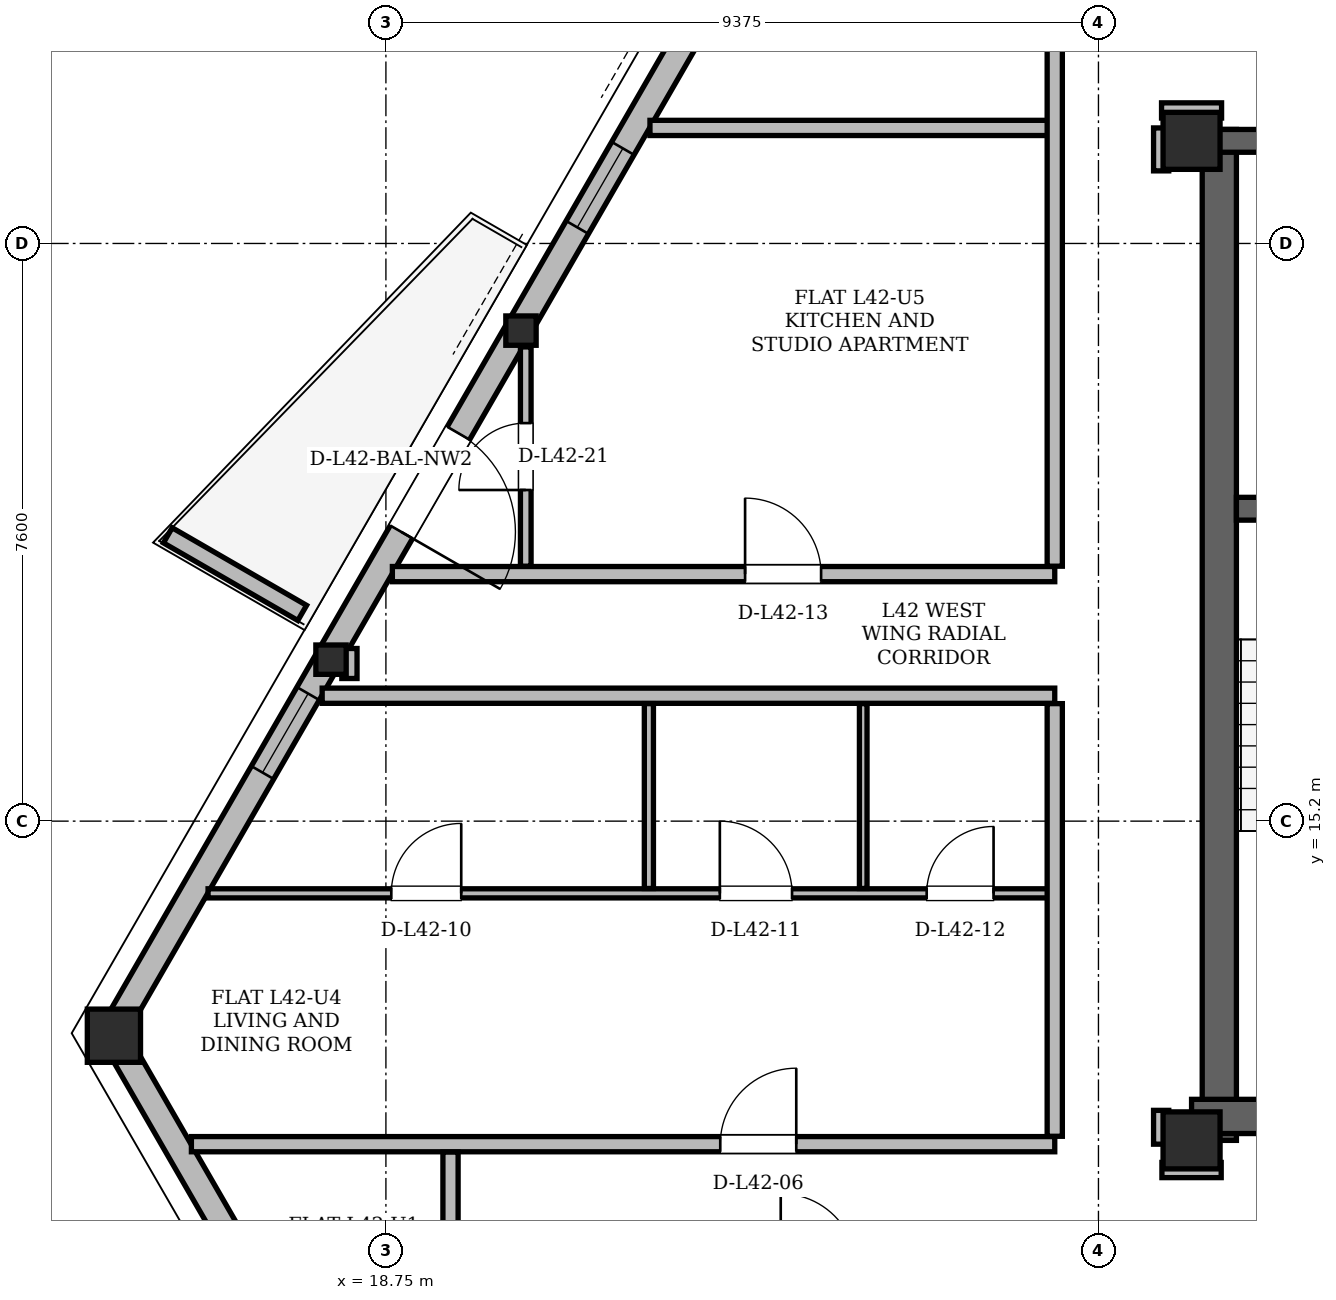
"""IFC4 building model, lengths in metres.
Left out: names, types, materials, properties, quantities, classifications, styles, units other than length and angle.
Written with IfcOpenShell. Run it as: python <this file> out.ifc"""

import sys

from ifc_helpers import new_model, si_unit, direction, frame, frame_2d, origin, origin_2d, place, context, subcontext, project, spatial, polyline, rectangle, hollow_rectangle, i_section, outline, extrude, element, fill, save


model = new_model("IFC4")
c1 = context("Model", 3, precision=1e-05, world=origin(), true_north=direction((0.0, 1.0)))
c2 = subcontext(c1, "Body", "Model", "MODEL_VIEW")
j1 = project(units=[si_unit("LENGTHUNIT", "METRE"), si_unit("PLANEANGLEUNIT", "RADIAN")], contexts=[c1])
p1 = place(None, origin())
s1 = spatial("IfcSite", under=j1, at=p1, CompositionType="ELEMENT")
p2 = place(p1, origin())
s2 = spatial("IfcBuilding", under=s1, at=p2, CompositionType="ELEMENT")
p3 = place(p2, frame((0.0, 0.0, 160.2)))
s3 = spatial("IfcBuildingStorey", under=s2, at=p3, CompositionType="ELEMENT", Elevation=160.2)
for number, where, z_axis, x_axis in (
    (1, (29.35, 11.0, 0.0), (0.0, 0.0, 1.0), (1.0, 0.0, 0.0)),
    (2, (29.35, 24.15, 0.0), (0.0, 0.0, 1.0), (1.0, 0.0, 0.0)),
):
    element("IfcColumn", number, at=place(p3, frame(where, z_axis=z_axis, x_axis=x_axis)), inside=s3, PredefinedType="COLUMN", context=c2, shape_type="SweptSolid", body=[
        extrude(hollow_rectangle(XDim=0.75, YDim=0.75, WallThickness=0.06, at=origin_2d()), origin(), (0.0, 0.0, 1.0), 3.6),
    ])
p4 = place(p3, frame((15.147, 12.41, 0.005), z_axis=(0.013594494866, -0.018352568069, 0.999739152457), x_axis=(0.803557193345, 0.595227550626, 0.0)))
e3 = element("IfcColumn", 3, at=p4, inside=s3, PredefinedType="COLUMN", context=c2, shape_type="SweptSolid", body=[
    extrude(hollow_rectangle(XDim=0.7, YDim=0.7, WallThickness=0.055, at=origin_2d()), origin(), (0.0, 0.0, 1.0), 3.592),
])
p5 = place(p3, frame((20.498, 21.678, 0.005), z_axis=(0.016313955353, -0.013662937608, 0.999773563862), x_axis=(0.642067671978, 0.766647966541, 0.0)))
e4 = element("IfcColumn", 4, at=p5, inside=s3, PredefinedType="COLUMN", context=c2, shape_type="SweptSolid", body=[
    extrude(i_section(OverallWidth=0.399, OverallDepth=0.386, WebThickness=0.021, FlangeThickness=0.033, at=origin_2d()), origin(), (0.0, 0.0, 1.0), 3.592),
])
p6 = place(p3, frame((18.001, 17.353, 0.005), z_axis=(0.015022255883, -0.015837943985, 0.99976171729), x_axis=(0.72554342724, 0.688176383777, 0.0)))
e5 = element("IfcColumn", 5, at=p6, inside=s3, PredefinedType="COLUMN", context=c2, shape_type="SweptSolid", body=[
    extrude(i_section(OverallWidth=0.399, OverallDepth=0.386, WebThickness=0.021, FlangeThickness=0.033, at=origin_2d()), origin(), (0.0, 0.0, 1.0), 3.592),
])
p7 = place(p3, frame((29.715, 11.0, 0.0), z_axis=(0.0, 0.0, 1.0), x_axis=(0.0, 1.0, 0.0)))
e6 = element("IfcWall", 6, at=p7, inside=s3, PredefinedType="SHEAR", context=c2, shape_type="SweptSolid", body=[
    extrude(rectangle(XDim=13.3, YDim=0.45, at=frame_2d((6.65, 0.0))), origin(), (0.0, 0.0, 1.0), 3.38),
])
p8 = place(p3, frame((29.35, 11.315, 0.0), z_axis=(0.0, 0.0, 1.0), x_axis=(1.0, 0.0, 0.0)))
e7 = element("IfcWall", 7, at=p8, inside=s3, PredefinedType="SHEAR", context=c2, shape_type="SweptSolid", body=[
    extrude(rectangle(XDim=7.1, YDim=0.45, at=frame_2d((3.55, 0.0))), origin(), (0.0, 0.0, 1.0), 3.38),
])
p9 = place(p3, frame((29.65, 24.15, 0.0), z_axis=(0.0, 0.0, 1.0), x_axis=(1.0, 0.0, 0.0)))
e8 = element("IfcWall", 8, at=p9, inside=s3, PredefinedType="SHEAR", context=c2, shape_type="SweptSolid", body=[
    extrude(rectangle(XDim=15.7, YDim=0.3, at=frame_2d((7.85, 0.0))), origin(), (0.0, 0.0, 1.0), 3.38),
])
p10 = place(p9, frame((1.7, 0.0, 0.0)))
e9 = element("IfcOpeningElement", 9, at=p10, cuts=e8, PredefinedType="OPENING", context=c2, shape_type="SweptSolid", body=[
    extrude(rectangle(XDim=1.2, YDim=2.2, at=frame_2d((0.6, 1.1))), frame((0.0, 0.15, 0.0), z_axis=(0.0, -1.0, 0.0), x_axis=(1.0, 0.0, 0.0)), (0.0, 0.0, 1.0), 0.3),
])
p11 = place(p9, frame((12.8, 0.0, 0.0)))
e10 = element("IfcOpeningElement", 10, at=p11, cuts=e8, PredefinedType="OPENING", context=c2, shape_type="SweptSolid", body=[
    extrude(rectangle(XDim=1.2, YDim=2.2, at=frame_2d((0.6, 1.1))), frame((0.0, 0.15, 0.0), z_axis=(0.0, -1.0, 0.0), x_axis=(1.0, 0.0, 0.0)), (0.0, 0.0, 1.0), 0.3),
])
p12 = place(p9, frame((6.55, 0.0, 0.0)))
e11 = element("IfcOpeningElement", 11, at=p12, cuts=e8, PredefinedType="OPENING", context=c2, shape_type="SweptSolid", body=[
    extrude(rectangle(XDim=0.9, YDim=2.05, at=frame_2d((0.45, 1.025))), frame((0.0, 0.15, 0.0), z_axis=(0.0, -1.0, 0.0), x_axis=(1.0, 0.0, 0.0)), (0.0, 0.0, 1.0), 0.3),
])
p13 = place(p9, frame((8.45, 0.0, 0.0)))
e12 = element("IfcOpeningElement", 12, at=p13, cuts=e8, PredefinedType="OPENING", context=c2, shape_type="SweptSolid", body=[
    extrude(rectangle(XDim=0.9, YDim=2.05, at=frame_2d((0.45, 1.025))), frame((0.0, 0.15, 0.0), z_axis=(0.0, -1.0, 0.0), x_axis=(1.0, 0.0, 0.0)), (0.0, 0.0, 1.0), 0.3),
])
p14 = place(p3, frame((29.94, 19.31, 0.0), z_axis=(0.0, 0.0, 1.0), x_axis=(1.0, 0.0, 0.0)))
e13 = element("IfcWall", 13, at=p14, inside=s3, PredefinedType="SHEAR", context=c2, shape_type="SweptSolid", body=[
    extrude(rectangle(XDim=4.01, YDim=0.3, at=frame_2d((2.005, 0.0))), origin(), (0.0, 0.0, 1.0), 3.38),
])
p15 = place(p14, frame((1.01, 0.0, 0.0)))
e14 = element("IfcOpeningElement", 14, at=p15, cuts=e13, PredefinedType="OPENING", context=c2, shape_type="SweptSolid", body=[
    extrude(rectangle(XDim=1.4, YDim=2.2, at=frame_2d((0.7, 1.1))), frame((0.0, 0.15, 0.0), z_axis=(0.0, -1.0, 0.0), x_axis=(1.0, 0.0, 0.0)), (0.0, 0.0, 1.0), 0.3),
])
p16 = place(p3, frame((15.147, 12.41, 0.0), z_axis=(0.0, 0.0, 1.0), x_axis=(0.500007864018, -0.866020863444, 0.0)))
e15 = element("IfcWall", 15, at=p16, inside=s3, PredefinedType="SOLIDWALL", context=c2, shape_type="SweptSolid", body=[
    extrude(rectangle(XDim=9.033, YDim=0.34, at=frame_2d((4.517, 0.0))), origin(), (0.0, 0.0, 1.0), 2.6),
])
p17 = place(p3, frame((32.983, 43.303, 0.0), z_axis=(0.0, 0.0, 1.0), x_axis=(-0.499995364632, -0.866028079999, 0.0)))
e16 = element("IfcWall", 16, at=p17, inside=s3, PredefinedType="SOLIDWALL", context=c2, shape_type="SweptSolid", body=[
    extrude(rectangle(XDim=35.673, YDim=0.34, at=frame_2d((17.836, 0.0))), origin(), (0.0, 0.0, 1.0), 2.6),
])
p18 = place(p17, frame((6.76, 0.0, 0.0)))
e17 = element("IfcOpeningElement", 17, at=p18, cuts=e16, PredefinedType="OPENING", context=c2, shape_type="SweptSolid", body=[
    extrude(rectangle(XDim=1.0, YDim=2.18, at=frame_2d((0.5, 1.09))), frame((0.0, 0.17, 0.0), z_axis=(0.0, -1.0, 0.0), x_axis=(1.0, 0.0, 0.0)), (0.0, 0.0, 1.0), 0.34),
])
p19 = place(p17, frame((26.558, 0.0, 0.0)))
e18 = element("IfcOpeningElement", 18, at=p19, cuts=e16, PredefinedType="OPENING", context=c2, shape_type="SweptSolid", body=[
    extrude(rectangle(XDim=1.5, YDim=2.2, at=frame_2d((0.75, 1.1))), frame((0.0, 0.17, 0.0), z_axis=(0.0, -1.0, 0.0), x_axis=(1.0, 0.0, 0.0)), (0.0, 0.0, 1.0), 0.34),
])
p20 = place(p17, frame((22.231, 0.0, 0.85)))
e19 = element("IfcOpeningElement", 19, at=p20, cuts=e16, PredefinedType="OPENING", context=c2, shape_type="SweptSolid", body=[
    extrude(rectangle(XDim=1.2, YDim=1.48, at=frame_2d((0.6, 0.74))), frame((0.0, 0.17, 0.0), z_axis=(0.0, -1.0, 0.0), x_axis=(1.0, 0.0, 0.0)), (0.0, 0.0, 1.0), 0.34),
])
p21 = place(p17, frame((11.758, 0.0, 0.85)))
e20 = element("IfcOpeningElement", 20, at=p21, cuts=e16, PredefinedType="OPENING", context=c2, shape_type="SweptSolid", body=[
    extrude(rectangle(XDim=2.2, YDim=1.64, at=frame_2d((1.1, 0.82))), frame((0.0, 0.17, 0.0), z_axis=(0.0, -1.0, 0.0), x_axis=(1.0, 0.0, 0.0)), (0.0, 0.0, 1.0), 0.34),
])
p22 = place(p17, frame((18.257, 0.0, 0.85)))
e21 = element("IfcOpeningElement", 21, at=p22, cuts=e16, PredefinedType="OPENING", context=c2, shape_type="SweptSolid", body=[
    extrude(rectangle(XDim=1.6, YDim=1.64, at=frame_2d((0.8, 0.82))), frame((0.0, 0.17, 0.0), z_axis=(0.0, -1.0, 0.0), x_axis=(1.0, 0.0, 0.0)), (0.0, 0.0, 1.0), 0.34),
])
p23 = place(p17, frame((1.108, 0.0, 0.85)))
e22 = element("IfcOpeningElement", 22, at=p23, cuts=e16, PredefinedType="OPENING", context=c2, shape_type="SweptSolid", body=[
    extrude(rectangle(XDim=1.8, YDim=1.64, at=frame_2d((0.9, 0.82))), frame((0.0, 0.17, 0.0), z_axis=(0.0, -1.0, 0.0), x_axis=(1.0, 0.0, 0.0)), (0.0, 0.0, 1.0), 0.34),
])
p24 = place(p17, frame((30.513, 0.0, 0.85)))
e23 = element("IfcOpeningElement", 23, at=p24, cuts=e16, PredefinedType="OPENING", context=c2, shape_type="SweptSolid", body=[
    extrude(rectangle(XDim=1.2, YDim=1.48, at=frame_2d((0.6, 0.74))), frame((0.0, 0.17, 0.0), z_axis=(0.0, -1.0, 0.0), x_axis=(1.0, 0.0, 0.0)), (0.0, 0.0, 1.0), 0.34),
])
p25 = place(p3, frame((17.649, 17.939, 0.0), z_axis=(0.0, 0.0, 1.0), x_axis=(-0.866012356593, 0.500022597718, 0.0)))
e24 = element("IfcWall", 24, at=p25, inside=s3, PredefinedType="PARAPET", context=c2, shape_type="SweptSolid", body=[
    extrude(outline(polyline([(0.0, 0.0), (2.042, 0.0), (2.042, 1.1), (0.0, 1.32), (0.0, 0.0)])), frame((0.0, 0.115, 0.0), z_axis=(0.0, -1.0, 0.0), x_axis=(1.0, 0.0, 0.0)), (0.0, 0.0, 1.0), 0.23),
])
p26 = place(p3, frame((28.96, 10.61, 0.0), z_axis=(0.0, 0.0, 1.0), x_axis=(1.0, 0.0, 0.0)))
e25 = element("IfcWall", 25, at=p26, inside=s3, PredefinedType="PARTITIONING", context=c2, shape_type="SweptSolid", body=[
    extrude(rectangle(XDim=0.78, YDim=0.2, at=frame_2d((0.39, 0.0))), origin(), (0.0, 0.0, 1.0), 2.42),
])
p27 = place(p3, frame((16.191, 10.95, 0.0), z_axis=(0.0, 0.0, 1.0), x_axis=(1.0, 0.0, 0.0)))
e26 = element("IfcWall", 26, at=p27, inside=s3, PredefinedType="PARTITIONING", context=c2, shape_type="SweptSolid", body=[
    extrude(rectangle(XDim=11.359, YDim=0.2, at=frame_2d((5.68, 0.0))), origin(), (0.0, 0.0, 1.0), 3.38),
])
p28 = place(p27, frame((6.958, 0.0, 0.0)))
e27 = element("IfcOpeningElement", 27, at=p28, cuts=e26, PredefinedType="OPENING", context=c2, shape_type="SweptSolid", body=[
    extrude(rectangle(XDim=1.0, YDim=2.18, at=frame_2d((0.5, 1.09))), frame((0.0, 0.1, 0.0), z_axis=(0.0, -1.0, 0.0), x_axis=(1.0, 0.0, 0.0)), (0.0, 0.0, 1.0), 0.2),
])
p29 = place(p3, frame((16.41, 14.25, 0.0), z_axis=(0.0, 0.0, 1.0), x_axis=(1.0, 0.0, 0.0)))
e28 = element("IfcWall", 28, at=p29, inside=s3, PredefinedType="PARTITIONING", context=c2, shape_type="SweptSolid", body=[
    extrude(rectangle(XDim=11.19, YDim=0.12, at=frame_2d((5.595, 0.0))), origin(), (0.0, 0.0, 1.0), 3.38),
])
p30 = place(p29, frame((2.411, 0.0, 0.0)))
e29 = element("IfcOpeningElement", 29, at=p30, cuts=e28, PredefinedType="OPENING", context=c2, shape_type="SweptSolid", body=[
    extrude(rectangle(XDim=0.92, YDim=2.12, at=frame_2d((0.46, 1.06))), frame((0.0, 0.06, 0.0), z_axis=(0.0, -1.0, 0.0), x_axis=(1.0, 0.0, 0.0)), (0.0, 0.0, 1.0), 0.12),
])
p31 = place(p29, frame((6.733, 0.0, 0.0)))
e30 = element("IfcOpeningElement", 30, at=p31, cuts=e28, PredefinedType="OPENING", context=c2, shape_type="SweptSolid", body=[
    extrude(rectangle(XDim=0.95, YDim=2.1, at=frame_2d((0.475, 1.05))), frame((0.0, 0.06, 0.0), z_axis=(0.0, -1.0, 0.0), x_axis=(1.0, 0.0, 0.0)), (0.0, 0.0, 1.0), 0.12),
])
p32 = place(p29, frame((9.455, 0.0, 0.0)))
e31 = element("IfcOpeningElement", 31, at=p32, cuts=e28, PredefinedType="OPENING", context=c2, shape_type="SweptSolid", body=[
    extrude(rectangle(XDim=0.88, YDim=2.08, at=frame_2d((0.44, 1.04))), frame((0.0, 0.06, 0.0), z_axis=(0.0, -1.0, 0.0), x_axis=(1.0, 0.0, 0.0)), (0.0, 0.0, 1.0), 0.12),
])
p33 = place(p3, frame((17.911, 16.85, 0.0), z_axis=(0.0, 0.0, 1.0), x_axis=(1.0, 0.0, 0.0)))
e32 = element("IfcWall", 32, at=p33, inside=s3, PredefinedType="PARTITIONING", context=c2, shape_type="SweptSolid", body=[
    extrude(rectangle(XDim=9.639, YDim=0.2, at=frame_2d((4.819, 0.0))), origin(), (0.0, 0.0, 1.0), 3.38),
])
p34 = place(p3, frame((18.835, 18.45, 0.0), z_axis=(0.0, 0.0, 1.0), x_axis=(1.0, 0.0, 0.0)))
e33 = element("IfcWall", 33, at=p34, inside=s3, PredefinedType="PARTITIONING", context=c2, shape_type="SweptSolid", body=[
    extrude(rectangle(XDim=8.715, YDim=0.2, at=frame_2d((4.357, 0.0))), origin(), (0.0, 0.0, 1.0), 3.38),
])
p35 = place(p34, frame((4.641, 0.0, 0.0)))
e34 = element("IfcOpeningElement", 34, at=p35, cuts=e33, PredefinedType="OPENING", context=c2, shape_type="SweptSolid", body=[
    extrude(rectangle(XDim=1.0, YDim=2.18, at=frame_2d((0.5, 1.09))), frame((0.0, 0.1, 0.0), z_axis=(0.0, -1.0, 0.0), x_axis=(1.0, 0.0, 0.0)), (0.0, 0.0, 1.0), 0.2),
])
p36 = place(p3, frame((22.224, 24.32, 0.0), z_axis=(0.0, 0.0, 1.0), x_axis=(1.0, 0.0, 0.0)))
e35 = element("IfcWall", 35, at=p36, inside=s3, PredefinedType="PARTITIONING", context=c2, shape_type="SweptSolid", body=[
    extrude(rectangle(XDim=5.326, YDim=0.2, at=frame_2d((2.663, 0.0))), origin(), (0.0, 0.0, 1.0), 3.38),
])
p37 = place(p3, frame((28.955, 24.55, 0.0), z_axis=(0.0, 0.0, 1.0), x_axis=(1.0, 0.0, 0.0)))
e36 = element("IfcWall", 36, at=p37, inside=s3, PredefinedType="PARTITIONING", context=c2, shape_type="SweptSolid", body=[
    extrude(rectangle(XDim=0.79, YDim=0.2, at=frame_2d((0.395, 0.0))), origin(), (0.0, 0.0, 1.0), 2.842),
])
p38 = place(p3, frame((18.27, 17.076, 0.0), z_axis=(0.0, 0.0, 1.0), x_axis=(0.0, 1.0, 0.0)))
e37 = element("IfcWall", 37, at=p38, inside=s3, PredefinedType="PARTITIONING", context=c2, shape_type="SweptSolid", body=[
    extrude(rectangle(XDim=0.395, YDim=0.2, at=frame_2d((0.198, 0.0))), origin(), (0.0, 0.0, 1.0), 3.38),
])
p39 = place(p3, frame((19.6, 9.404, 0.0), z_axis=(0.0, 0.0, 1.0), x_axis=(0.0, 1.0, 0.0)))
e38 = element("IfcWall", 38, at=p39, inside=s3, PredefinedType="PARTITIONING", context=c2, shape_type="SweptSolid", body=[
    extrude(rectangle(XDim=1.442, YDim=0.2, at=frame_2d((0.721, 0.0))), origin(), (0.0, 0.0, 1.0), 3.38),
])
p40 = place(p3, frame((20.59, 18.554, 0.0), z_axis=(0.0, 0.0, 1.0), x_axis=(0.0, 1.0, 0.0)))
e39 = element("IfcWall", 39, at=p40, inside=s3, PredefinedType="PARTITIONING", context=c2, shape_type="SweptSolid", body=[
    extrude(rectangle(XDim=2.885, YDim=0.14, at=frame_2d((1.442, 0.0))), origin(), (0.0, 0.0, 1.0), 3.38),
])
p41 = place(p40, frame((1.003, 0.0, 0.0)))
e40 = element("IfcOpeningElement", 40, at=p41, cuts=e39, PredefinedType="OPENING", context=c2, shape_type="SweptSolid", body=[
    extrude(rectangle(XDim=0.88, YDim=2.08, at=frame_2d((0.44, 1.04))), frame((0.0, 0.07, 0.0), z_axis=(0.0, -1.0, 0.0), x_axis=(1.0, 0.0, 0.0)), (0.0, 0.0, 1.0), 0.14),
])
p42 = place(p3, frame((22.21, 14.314, 0.0), z_axis=(0.0, 0.0, 1.0), x_axis=(0.0, 1.0, 0.0)))
e41 = element("IfcWall", 41, at=p42, inside=s3, PredefinedType="PARTITIONING", context=c2, shape_type="SweptSolid", body=[
    extrude(rectangle(XDim=2.432, YDim=0.12, at=frame_2d((1.216, 0.0))), origin(), (0.0, 0.0, 1.0), 3.38),
])
p43 = place(p3, frame((25.03, 14.314, 0.0), z_axis=(0.0, 0.0, 1.0), x_axis=(0.0, 1.0, 0.0)))
e42 = element("IfcWall", 42, at=p43, inside=s3, PredefinedType="PARTITIONING", context=c2, shape_type="SweptSolid", body=[
    extrude(rectangle(XDim=2.432, YDim=0.1, at=frame_2d((1.216, 0.0))), origin(), (0.0, 0.0, 1.0), 3.38),
])
p44 = place(p3, frame((27.55, 11.054, 0.0), z_axis=(0.0, 0.0, 1.0), x_axis=(0.0, 1.0, 0.0)))
e43 = element("IfcWall", 43, at=p44, inside=s3, PredefinedType="PARTITIONING", context=c2, shape_type="SweptSolid", body=[
    extrude(rectangle(XDim=5.692, YDim=0.2, at=frame_2d((2.846, 0.0))), origin(), (0.0, 0.0, 1.0), 2.842),
])
p45 = place(p3, frame((27.55, 18.554, 0.0), z_axis=(0.0, 0.0, 1.0), x_axis=(0.0, 1.0, 0.0)))
e44 = element("IfcWall", 44, at=p45, inside=s3, PredefinedType="PARTITIONING", context=c2, shape_type="SweptSolid", body=[
    extrude(rectangle(XDim=7.312, YDim=0.2, at=frame_2d((3.656, 0.0))), origin(), (0.0, 0.0, 1.0), 3.38),
])
p46 = place(p3, frame((28.95, 10.95, 0.0), z_axis=(0.0, 0.0, 1.0), x_axis=(0.0, 1.0, 0.0)))
e45 = element("IfcWall", 45, at=p46, inside=s3, PredefinedType="PARTITIONING", context=c2, shape_type="SweptSolid", body=[
    extrude(rectangle(XDim=0.445, YDim=0.2, at=frame_2d((0.223, 0.0))), origin(), (0.0, 0.0, 1.0), 2.842),
])
p47 = place(p3, frame((28.95, 23.755, 0.0), z_axis=(0.0, 0.0, 1.0), x_axis=(0.0, 1.0, 0.0)))
e46 = element("IfcWall", 46, at=p47, inside=s3, PredefinedType="PARTITIONING", context=c2, shape_type="SweptSolid", body=[
    extrude(rectangle(XDim=0.565, YDim=0.2, at=frame_2d((0.283, 0.0))), origin(), (0.0, 0.0, 1.0), 3.38),
])
p48 = place(p19, origin())
e47 = element("IfcDoor", 47, at=p48, inside=s3, OperationType="SINGLE_SWING_RIGHT", PredefinedType="DOOR", context=c2, shape_type="SweptSolid", body=[
    extrude(rectangle(XDim=1.5, YDim=2.2, at=frame_2d((0.75, 1.1))), frame((0.0, 0.025, 0.0), z_axis=(0.0, -1.0, 0.0), x_axis=(1.0, 0.0, 0.0)), (0.0, 0.0, 1.0), 0.05),
])
fill(e18, e47)
p49 = place(p20, origin())
e48 = element("IfcWindow", 48, at=p49, inside=s3, PartitioningType="SINGLE_PANEL", PredefinedType="WINDOW", context=c2, shape_type="SweptSolid", body=[
    extrude(rectangle(XDim=1.2, YDim=1.48, at=frame_2d((0.6, 0.74))), frame((0.0, 0.03, 0.0), z_axis=(0.0, -1.0, 0.0), x_axis=(1.0, 0.0, 0.0)), (0.0, 0.0, 1.0), 0.06),
])
fill(e19, e48)
p50 = place(p24, origin())
e49 = element("IfcWindow", 49, at=p50, inside=s3, PartitioningType="SINGLE_PANEL", PredefinedType="WINDOW", context=c2, shape_type="SweptSolid", body=[
    extrude(rectangle(XDim=1.2, YDim=1.48, at=frame_2d((0.6, 0.74))), frame((0.0, 0.03, 0.0), z_axis=(0.0, -1.0, 0.0), x_axis=(1.0, 0.0, 0.0)), (0.0, 0.0, 1.0), 0.06),
])
fill(e23, e49)
p51 = place(p28, origin())
e50 = element("IfcDoor", 50, at=p51, inside=s3, OperationType="SINGLE_SWING_RIGHT", PredefinedType="DOOR", context=c2, shape_type="SweptSolid", body=[
    extrude(rectangle(XDim=1.0, YDim=2.18, at=frame_2d((0.5, 1.09))), frame((0.0, 0.025, 0.0), z_axis=(0.0, -1.0, 0.0), x_axis=(1.0, 0.0, 0.0)), (0.0, 0.0, 1.0), 0.05),
])
fill(e27, e50)
p52 = place(p30, origin())
e51 = element("IfcDoor", 51, at=p52, inside=s3, OperationType="SINGLE_SWING_RIGHT", PredefinedType="DOOR", context=c2, shape_type="SweptSolid", body=[
    extrude(rectangle(XDim=0.92, YDim=2.12, at=frame_2d((0.46, 1.06))), frame((0.0, 0.025, 0.0), z_axis=(0.0, -1.0, 0.0), x_axis=(1.0, 0.0, 0.0)), (0.0, 0.0, 1.0), 0.05),
])
fill(e29, e51)
p53 = place(p31, origin())
e52 = element("IfcDoor", 52, at=p53, inside=s3, OperationType="SINGLE_SWING_LEFT", PredefinedType="DOOR", context=c2, shape_type="SweptSolid", body=[
    extrude(rectangle(XDim=0.95, YDim=2.1, at=frame_2d((0.475, 1.05))), frame((0.0, 0.025, 0.0), z_axis=(0.0, -1.0, 0.0), x_axis=(1.0, 0.0, 0.0)), (0.0, 0.0, 1.0), 0.05),
])
fill(e30, e52)
p54 = place(p32, origin())
e53 = element("IfcDoor", 53, at=p54, inside=s3, OperationType="SINGLE_SWING_RIGHT", PredefinedType="DOOR", context=c2, shape_type="SweptSolid", body=[
    extrude(rectangle(XDim=0.88, YDim=2.08, at=frame_2d((0.44, 1.04))), frame((0.0, 0.025, 0.0), z_axis=(0.0, -1.0, 0.0), x_axis=(1.0, 0.0, 0.0)), (0.0, 0.0, 1.0), 0.05),
])
fill(e31, e53)
p55 = place(p35, origin())
e54 = element("IfcDoor", 54, at=p55, inside=s3, OperationType="SINGLE_SWING_LEFT", PredefinedType="DOOR", context=c2, shape_type="SweptSolid", body=[
    extrude(rectangle(XDim=1.0, YDim=2.18, at=frame_2d((0.5, 1.09))), frame((0.0, 0.025, 0.0), z_axis=(0.0, -1.0, 0.0), x_axis=(1.0, 0.0, 0.0)), (0.0, 0.0, 1.0), 0.05),
])
fill(e34, e54)
p56 = place(p41, origin())
e55 = element("IfcDoor", 55, at=p56, inside=s3, OperationType="SINGLE_SWING_LEFT", PredefinedType="DOOR", context=c2, shape_type="SweptSolid", body=[
    extrude(rectangle(XDim=0.88, YDim=2.08, at=frame_2d((0.44, 1.04))), frame((0.0, 0.025, 0.0), z_axis=(0.0, -1.0, 0.0), x_axis=(1.0, 0.0, 0.0)), (0.0, 0.0, 1.0), 0.05),
])
fill(e40, e55)
save(model, sys.argv[1])
